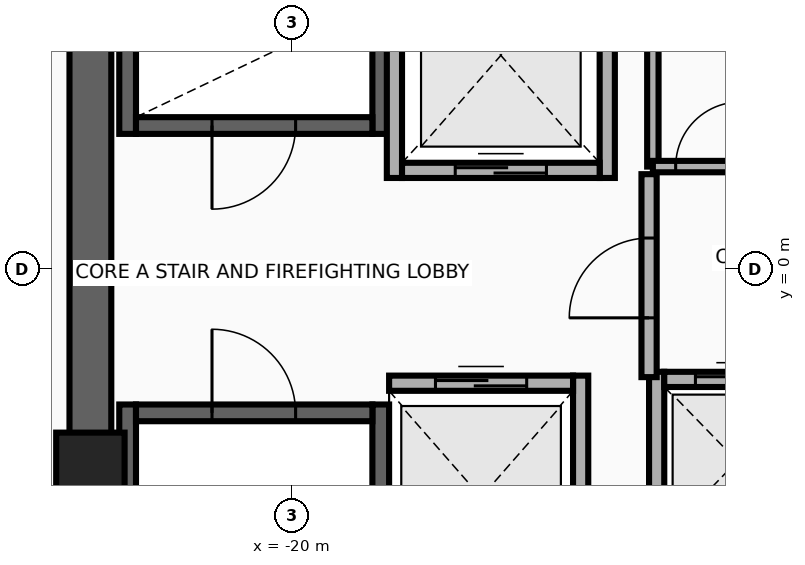
"""IFC4 building model, lengths in metres.
Left out: names, types, materials, properties, quantities, classifications, styles, units other than length and angle.
Written with IfcOpenShell. Run it as: python <this file> out.ifc"""

import sys

from ifc_helpers import new_model, si_unit, direction, frame, frame_2d, origin, origin_2d, place, context, subcontext, project, spatial, rectangle, extrude, source, transform, mapped, element, fill, save


model = new_model("IFC4")
c1 = context("Model", 3, precision=1e-05, world=origin(), true_north=direction((0.0, 1.0)))
c2 = subcontext(c1, "Body", "Model", "MODEL_VIEW")
j1 = project(units=[si_unit("LENGTHUNIT", "METRE"), si_unit("PLANEANGLEUNIT", "RADIAN")], contexts=[c1])
p1 = place(None, origin())
s1 = spatial("IfcSite", under=j1, at=p1, CompositionType="ELEMENT")
p2 = place(p1, origin())
s2 = spatial("IfcBuilding", under=s1, at=p2, CompositionType="ELEMENT")
p3 = place(p2, frame((0.0, 0.0, 230.0)))
s3 = spatial("IfcBuildingStorey", under=s2, at=p3, CompositionType="ELEMENT", Elevation=230.0)
for number, where, z_axis, x_axis in (
    (1, (-22.16, 1.78, 0.0), (0.0, 0.0, 1.0), (0.0, 1.0, 0.0)),
    (2, (-18.83, 1.78, 0.0), (0.0, 0.0, 1.0), (0.0, 1.0, 0.0)),
):
    element("IfcWall", number, at=place(p3, frame(where, z_axis=z_axis, x_axis=x_axis)), inside=s3, PredefinedType="SHEAR", context=c2, shape_type="SweptSolid", body=[
        extrude(rectangle(XDim=8.745, YDim=0.22, at=frame_2d((4.373, 0.0))), origin(), (0.0, 0.0, 1.0), 3.26),
    ])
p4 = place(p3, frame((-22.05, 1.89, 0.0), z_axis=(0.0, 0.0, 1.0), x_axis=(1.0, 0.0, 0.0)))
e3 = element("IfcWall", 3, at=p4, inside=s3, PredefinedType="SHEAR", context=c2, shape_type="SweptSolid", body=[
    extrude(rectangle(XDim=3.11, YDim=0.22, at=frame_2d((1.555, 0.0))), origin(), (0.0, 0.0, 1.0), 3.26),
])
p5 = place(p4, frame((1.0, 0.0, 0.0)))
e4 = element("IfcOpeningElement", 4, at=p5, cuts=e3, PredefinedType="OPENING", context=c2, shape_type="SweptSolid", body=[
    extrude(rectangle(XDim=1.1, YDim=2.15, at=frame_2d((0.55, 1.075))), frame((0.0, 0.125, 0.0), z_axis=(0.0, -1.0, 0.0), x_axis=(1.0, 0.0, 0.0)), (0.0, 0.0, 1.0), 0.25),
])
for number, where, z_axis, x_axis in (
    (5, (-22.16, -10.525, 0.0), (0.0, 0.0, 1.0), (0.0, 1.0, 0.0)),
    (6, (-18.83, -10.525, 0.0), (0.0, 0.0, 1.0), (0.0, 1.0, 0.0)),
):
    element("IfcWall", number, at=place(p3, frame(where, z_axis=z_axis, x_axis=x_axis)), inside=s3, PredefinedType="SHEAR", context=c2, shape_type="SweptSolid", body=[
        extrude(rectangle(XDim=8.745, YDim=0.22, at=frame_2d((4.373, 0.0))), origin(), (0.0, 0.0, 1.0), 3.26),
    ])
p6 = place(p3, frame((-22.05, -1.89, 0.0), z_axis=(0.0, 0.0, 1.0), x_axis=(1.0, 0.0, 0.0)))
e7 = element("IfcWall", 7, at=p6, inside=s3, PredefinedType="SHEAR", context=c2, shape_type="SweptSolid", body=[
    extrude(rectangle(XDim=3.11, YDim=0.22, at=frame_2d((1.555, 0.0))), origin(), (0.0, 0.0, 1.0), 3.26),
])
p7 = place(p6, frame((1.0, 0.0, 0.0)))
e8 = element("IfcOpeningElement", 8, at=p7, cuts=e7, PredefinedType="OPENING", context=c2, shape_type="SweptSolid", body=[
    extrude(rectangle(XDim=1.1, YDim=2.15, at=frame_2d((0.55, 1.075))), frame((0.0, 0.125, 0.0), z_axis=(0.0, -1.0, 0.0), x_axis=(1.0, 0.0, 0.0)), (0.0, 0.0, 1.0), 0.25),
])
p8 = place(p3, frame((-22.65, -11.075, 0.0), z_axis=(0.0, 0.0, 1.0), x_axis=(0.0, 1.0, 0.0)))
e9 = element("IfcWall", 9, at=p8, inside=s3, PredefinedType="SHEAR", context=c2, shape_type="SweptSolid", body=[
    extrude(rectangle(XDim=22.15, YDim=0.55, at=frame_2d((11.075, 0.0))), origin(), (0.0, 0.0, 1.0), 3.26),
])
m1 = source(origin(), c2, "Body", "SweptSolid", [
    extrude(rectangle(XDim=0.9, YDim=0.9, at=origin_2d()), origin(), (0.0, 0.0, 1.0), 3.5),
])
p9 = place(p3, frame((-22.65, -2.6, 0.0), z_axis=(0.0, 0.0, 1.0), x_axis=(1.0, 0.0, 0.0)))
e10 = element("IfcColumn", 10, at=p9, inside=s3, PredefinedType="COLUMN", context=c2, shape_type="MappedRepresentation", body=[
    mapped(m1, transform((0.0, 0.0, 0.0), x_axis=(1.0, 0.0, 0.0), y_axis=(0.0, 1.0, 0.0), z_axis=(0.0, 0.0, 1.0), scale=1.0)),
])
for number, where, z_axis, x_axis in (
    (11, (-18.65, 1.2, 0.0), (0.0, 0.0, 1.0), (0.0, 1.0, 0.0)),
    (12, (-15.85, 1.2, 0.0), (0.0, 0.0, 1.0), (0.0, 1.0, 0.0)),
):
    element("IfcWall", number, at=place(p3, frame(where, z_axis=z_axis, x_axis=x_axis)), inside=s3, PredefinedType="MOVABLE", context=c2, shape_type="SweptSolid", body=[
        extrude(rectangle(XDim=3.225, YDim=0.2, at=frame_2d((1.613, 0.0))), origin(), (0.0, 0.0, 1.0), 3.26),
    ])
p10 = place(p3, frame((-18.55, 1.3, 0.0), z_axis=(0.0, 0.0, 1.0), x_axis=(1.0, 0.0, 0.0)))
e13 = element("IfcWall", 13, at=p10, inside=s3, PredefinedType="MOVABLE", context=c2, shape_type="SweptSolid", body=[
    extrude(rectangle(XDim=2.6, YDim=0.2, at=frame_2d((1.3, 0.0))), origin(), (0.0, 0.0, 1.0), 3.26),
])
p11 = place(p10, frame((0.7, 0.0, 0.0)))
e14 = element("IfcOpeningElement", 14, at=p11, cuts=e13, PredefinedType="OPENING", context=c2, shape_type="SweptSolid", body=[
    extrude(rectangle(XDim=1.2, YDim=2.1, at=frame_2d((0.6, 1.05))), frame((0.0, 0.115, 0.0), z_axis=(0.0, -1.0, 0.0), x_axis=(1.0, 0.0, 0.0)), (0.0, 0.0, 1.0), 0.23),
])
p12 = place(p3, frame((-16.2, -4.6, 0.0), z_axis=(0.0, 0.0, 1.0), x_axis=(0.0, 1.0, 0.0)))
e15 = element("IfcWall", 15, at=p12, inside=s3, PredefinedType="MOVABLE", context=c2, shape_type="SweptSolid", body=[
    extrude(rectangle(XDim=3.2, YDim=0.2, at=frame_2d((1.6, 0.0))), origin(), (0.0, 0.0, 1.0), 3.26),
])
p13 = place(p3, frame((-18.72, -1.5, 0.0), z_axis=(0.0, 0.0, 1.0), x_axis=(1.0, 0.0, 0.0)))
e16 = element("IfcWall", 16, at=p13, inside=s3, PredefinedType="MOVABLE", context=c2, shape_type="SweptSolid", body=[
    extrude(rectangle(XDim=2.42, YDim=0.2, at=frame_2d((1.21, 0.0))), origin(), (0.0, 0.0, 1.0), 3.26),
])
p14 = place(p13, frame((0.61, 0.0, 0.0)))
e17 = element("IfcOpeningElement", 17, at=p14, cuts=e16, PredefinedType="OPENING", context=c2, shape_type="SweptSolid", body=[
    extrude(rectangle(XDim=1.2, YDim=2.1, at=frame_2d((0.6, 1.05))), frame((0.0, 0.115, 0.0), z_axis=(0.0, -1.0, 0.0), x_axis=(1.0, 0.0, 0.0)), (0.0, 0.0, 1.0), 0.23),
])
p15 = place(p3, frame((-15.2, -3.7, 0.0), z_axis=(0.0, 0.0, 1.0), x_axis=(0.0, 1.0, 0.0)))
e18 = element("IfcWall", 18, at=p15, inside=s3, PredefinedType="MOVABLE", context=c2, shape_type="SweptSolid", body=[
    extrude(rectangle(XDim=2.35, YDim=0.2, at=frame_2d((1.175, 0.0))), origin(), (0.0, 0.0, 1.0), 3.26),
])
p16 = place(p3, frame((-15.1, -1.45, 0.0), z_axis=(0.0, 0.0, 1.0), x_axis=(1.0, 0.0, 0.0)))
e19 = element("IfcWall", 19, at=p16, inside=s3, PredefinedType="MOVABLE", context=c2, shape_type="SweptSolid", body=[
    extrude(rectangle(XDim=1.92, YDim=0.2, at=frame_2d((0.96, 0.0))), origin(), (0.0, 0.0, 1.0), 3.26),
])
p17 = place(p16, frame((0.41, 0.0, 0.0)))
e20 = element("IfcOpeningElement", 20, at=p17, cuts=e19, PredefinedType="OPENING", context=c2, shape_type="SweptSolid", body=[
    extrude(rectangle(XDim=1.1, YDim=2.1, at=frame_2d((0.55, 1.05))), frame((0.0, 0.115, 0.0), z_axis=(0.0, -1.0, 0.0), x_axis=(1.0, 0.0, 0.0)), (0.0, 0.0, 1.0), 0.23),
])
p18 = place(p3, frame((-15.3, -1.42, 0.0), z_axis=(0.0, 0.0, 1.0), x_axis=(0.0, 1.0, 0.0)))
e21 = element("IfcWall", 21, at=p18, inside=s3, PredefinedType="PARTITIONING", context=c2, shape_type="SweptSolid", body=[
    extrude(rectangle(XDim=2.67, YDim=0.2, at=frame_2d((1.335, 0.0))), origin(), (0.0, 0.0, 1.0), 3.26),
])
p19 = place(p18, frame((0.78, 0.0, 0.0)))
e22 = element("IfcOpeningElement", 22, at=p19, cuts=e21, PredefinedType="OPENING", context=c2, shape_type="SweptSolid", body=[
    extrude(rectangle(XDim=1.05, YDim=2.15, at=frame_2d((0.525, 1.075))), frame((0.0, 0.115, 0.0), z_axis=(0.0, -1.0, 0.0), x_axis=(1.0, 0.0, 0.0)), (0.0, 0.0, 1.0), 0.23),
])
p20 = place(p3, frame((-15.25, 1.35, 0.0), z_axis=(0.0, 0.0, 1.0), x_axis=(0.0, 1.0, 0.0)))
e23 = element("IfcWall", 23, at=p20, inside=s3, PredefinedType="PARTITIONING", context=c2, shape_type="SweptSolid", body=[
    extrude(rectangle(XDim=1.95, YDim=0.15, at=frame_2d((0.975, 0.0))), origin(), (0.0, 0.0, 1.0), 3.26),
])
p21 = place(p3, frame((-15.25, 1.35, 0.0), z_axis=(0.0, 0.0, 1.0), x_axis=(1.0, 0.0, 0.0)))
e24 = element("IfcWall", 24, at=p21, inside=s3, PredefinedType="PARTITIONING", context=c2, shape_type="SweptSolid", body=[
    extrude(rectangle(XDim=2.1, YDim=0.15, at=frame_2d((1.05, 0.0))), origin(), (0.0, 0.0, 1.0), 3.26),
])
p22 = place(p21, frame((0.3, 0.0, 0.0)))
e25 = element("IfcOpeningElement", 25, at=p22, cuts=e24, PredefinedType="OPENING", context=c2, shape_type="SweptSolid", body=[
    extrude(rectangle(XDim=0.85, YDim=2.05, at=frame_2d((0.425, 1.025))), frame((0.0, 0.09, 0.0), z_axis=(0.0, -1.0, 0.0), x_axis=(1.0, 0.0, 0.0)), (0.0, 0.0, 1.0), 0.18),
])
p23 = place(p11, origin())
e26 = element("IfcDoor", 26, at=p23, inside=s3, OperationType="DOUBLE_DOOR_SLIDING", PredefinedType="DOOR", context=c2, shape_type="SweptSolid", body=[
    extrude(rectangle(XDim=1.2, YDim=2.1, at=frame_2d((0.6, 1.05))), frame((0.0, 0.025, 0.0), z_axis=(0.0, -1.0, 0.0), x_axis=(1.0, 0.0, 0.0)), (0.0, 0.0, 1.0), 0.05),
])
fill(e14, e26)
p24 = place(p14, origin())
e27 = element("IfcDoor", 27, at=p24, inside=s3, OperationType="DOUBLE_DOOR_SLIDING", PredefinedType="DOOR", context=c2, shape_type="SweptSolid", body=[
    extrude(rectangle(XDim=1.2, YDim=2.1, at=frame_2d((0.6, 1.05))), frame((0.0, 0.025, 0.0), z_axis=(0.0, -1.0, 0.0), x_axis=(1.0, 0.0, 0.0)), (0.0, 0.0, 1.0), 0.05),
])
fill(e17, e27)
p25 = place(p17, origin())
e28 = element("IfcDoor", 28, at=p25, inside=s3, OperationType="DOUBLE_DOOR_SLIDING", PredefinedType="DOOR", context=c2, shape_type="SweptSolid", body=[
    extrude(rectangle(XDim=1.1, YDim=2.1, at=frame_2d((0.55, 1.05))), frame((0.0, 0.025, 0.0), z_axis=(0.0, -1.0, 0.0), x_axis=(1.0, 0.0, 0.0)), (0.0, 0.0, 1.0), 0.05),
])
fill(e20, e28)
p26 = place(p19, origin())
e29 = element("IfcDoor", 29, at=p26, inside=s3, OperationType="SINGLE_SWING_RIGHT", PredefinedType="DOOR", context=c2, shape_type="SweptSolid", body=[
    extrude(rectangle(XDim=1.05, YDim=2.15, at=frame_2d((0.525, 1.075))), frame((0.0, 0.025, 0.0), z_axis=(0.0, -1.0, 0.0), x_axis=(1.0, 0.0, 0.0)), (0.0, 0.0, 1.0), 0.05),
])
fill(e22, e29)
p27 = place(p5, frame((1.1, 0.0, 0.0), z_axis=(0.0, 0.0, 1.0), x_axis=(-1.0, 0.0, 0.0)))
e30 = element("IfcDoor", 30, at=p27, inside=s3, OperationType="SINGLE_SWING_LEFT", PredefinedType="DOOR", context=c2, shape_type="SweptSolid", body=[
    extrude(rectangle(XDim=1.1, YDim=2.15, at=frame_2d((0.55, 1.075))), frame((0.0, 0.025, 0.0), z_axis=(0.0, -1.0, 0.0), x_axis=(1.0, 0.0, 0.0)), (0.0, 0.0, 1.0), 0.05),
])
fill(e4, e30)
p28 = place(p7, origin())
e31 = element("IfcDoor", 31, at=p28, inside=s3, OperationType="SINGLE_SWING_RIGHT", PredefinedType="DOOR", context=c2, shape_type="SweptSolid", body=[
    extrude(rectangle(XDim=1.1, YDim=2.15, at=frame_2d((0.55, 1.075))), frame((0.0, 0.025, 0.0), z_axis=(0.0, -1.0, 0.0), x_axis=(1.0, 0.0, 0.0)), (0.0, 0.0, 1.0), 0.05),
])
fill(e8, e31)
p29 = place(p22, origin())
e32 = element("IfcDoor", 32, at=p29, inside=s3, OperationType="SINGLE_SWING_RIGHT", PredefinedType="DOOR", context=c2, shape_type="SweptSolid", body=[
    extrude(rectangle(XDim=0.85, YDim=2.05, at=frame_2d((0.425, 1.025))), frame((0.0, 0.025, 0.0), z_axis=(0.0, -1.0, 0.0), x_axis=(1.0, 0.0, 0.0)), (0.0, 0.0, 1.0), 0.05),
])
fill(e25, e32)
save(model, sys.argv[1])
